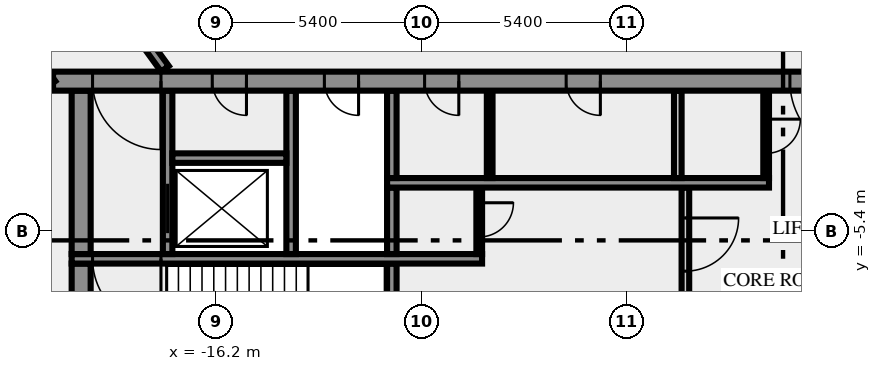
"""IFC4 building model, lengths in metres.
Left out: names, types, materials, properties, quantities, classifications, styles, units other than length and angle.
Written with IfcOpenShell. Run it as: python <this file> out.ifc"""

import sys

from ifc_helpers import new_model, si_unit, direction, frame, frame_2d, origin, place, context, subcontext, project, spatial, rectangle, extrude, element, fill, save


model = new_model("IFC4")
c1 = context("Model", 3, precision=1e-05, world=origin(), true_north=direction((0.0, 1.0)))
c2 = subcontext(c1, "Body", "Model", "MODEL_VIEW")
j1 = project(units=[si_unit("LENGTHUNIT", "METRE"), si_unit("PLANEANGLEUNIT", "RADIAN")], contexts=[c1])
p1 = place(None, origin())
s1 = spatial("IfcSite", under=j1, at=p1, CompositionType="ELEMENT")
p2 = place(p1, origin())
s2 = spatial("IfcBuilding", under=s1, at=p2, CompositionType="ELEMENT")
p3 = place(p2, frame((0.0, 0.0, 198.0)))
s3 = spatial("IfcBuildingStorey", under=s2, at=p3, CompositionType="ELEMENT", Elevation=198.0)
p4 = place(p3, frame((-19.75, -10.5, 0.0), z_axis=(0.0, 0.0, 1.0), x_axis=(0.0, 1.0, 0.0)))
e1 = element("IfcWall", 1, at=p4, inside=s3, PredefinedType="SHEAR", context=c2, shape_type="SweptSolid", body=[
    extrude(rectangle(XDim=4.25, YDim=0.5, at=frame_2d((2.125, 0.0))), origin(), (0.0, 0.0, 1.0), 3.65),
])
p5 = place(p3, frame((-11.575, -7.25, 0.0), z_axis=(0.0, 0.0, 1.0), x_axis=(0.0, 1.0, 0.0)))
e2 = element("IfcWall", 2, at=p5, inside=s3, PredefinedType="SHEAR", context=c2, shape_type="SweptSolid", body=[
    extrude(rectangle(XDim=1.0, YDim=0.25, at=frame_2d((0.5, 0.0))), origin(), (0.0, 0.0, 1.0), 3.65),
])
p6 = place(p3, frame((-3.85, -4.25, 0.0), z_axis=(0.0, 0.0, 1.0), x_axis=(0.0, -1.0, 0.0)))
e3 = element("IfcWall", 3, at=p6, inside=s3, PredefinedType="SOLIDWALL", context=c2, shape_type="SweptSolid", body=[
    extrude(rectangle(XDim=3.0, YDim=0.2, at=frame_2d((1.5, 0.0))), origin(), (0.0, 0.0, 1.0), 3.65),
])
p7 = place(p6, frame((0.8, 0.0, 0.0)))
e4 = element("IfcOpeningElement", 4, at=p7, cuts=e3, PredefinedType="OPENING", context=c2, shape_type="SweptSolid", body=[
    extrude(rectangle(XDim=1.4, YDim=2.1, at=frame_2d((0.7, 1.05))), frame((0.0, 0.11, 0.0), z_axis=(0.0, -1.0, 0.0), x_axis=(1.0, 0.0, 0.0)), (0.0, 0.0, 1.0), 0.22),
])
p8 = place(p3, frame((-9.2, -6.125, 0.0), z_axis=(0.0, 0.0, 1.0), x_axis=(-1.0, 0.0, 0.0)))
e5 = element("IfcWall", 5, at=p8, inside=s3, PredefinedType="SHEAR", context=c2, shape_type="SweptSolid", body=[
    extrude(rectangle(XDim=10.8, YDim=0.25, at=frame_2d((5.4, 0.0))), origin(), (0.0, 0.0, 1.0), 3.65),
])
p9 = place(p8, frame((8.45, 0.0, 0.0)))
e6 = element("IfcOpeningElement", 6, at=p9, cuts=e5, PredefinedType="OPENING", context=c2, shape_type="SweptSolid", body=[
    extrude(rectangle(XDim=1.8, YDim=2.1, at=frame_2d((0.9, 1.05))), frame((0.0, 0.135, 0.0), z_axis=(0.0, -1.0, 0.0), x_axis=(1.0, 0.0, 0.0)), (0.0, 0.0, 1.0), 0.27),
])
p10 = place(p3, frame((-19.75, -6.0, 0.0), z_axis=(0.0, 0.0, 1.0), x_axis=(0.0, 1.0, 0.0)))
e7 = element("IfcWall", 7, at=p10, inside=s3, PredefinedType="SHEAR", context=c2, shape_type="SweptSolid", body=[
    extrude(rectangle(XDim=4.3, YDim=0.5, at=frame_2d((2.15, 0.0))), origin(), (0.0, 0.0, 1.0), 3.65),
])
p11 = place(p3, frame((-17.475, -6.0, 0.0), z_axis=(0.0, 0.0, 1.0), x_axis=(0.0, 1.0, 0.0)))
e8 = element("IfcWall", 8, at=p11, inside=s3, PredefinedType="SHEAR", context=c2, shape_type="SweptSolid", body=[
    extrude(rectangle(XDim=4.3, YDim=0.25, at=frame_2d((2.15, 0.0))), origin(), (0.0, 0.0, 1.0), 3.65),
])
p12 = place(p11, frame((0.55, 0.0, 0.0)))
e9 = element("IfcOpeningElement", 9, at=p12, cuts=e8, PredefinedType="OPENING", context=c2, shape_type="SweptSolid", body=[
    extrude(rectangle(XDim=1.3, YDim=2.1, at=frame_2d((0.65, 1.05))), frame((0.0, 0.135, 0.0), z_axis=(0.0, -1.0, 0.0), x_axis=(1.0, 0.0, 0.0)), (0.0, 0.0, 1.0), 0.27),
])
p13 = place(p3, frame((-14.225, -6.0, 0.0), z_axis=(0.0, 0.0, 1.0), x_axis=(0.0, 1.0, 0.0)))
e10 = element("IfcWall", 10, at=p13, inside=s3, PredefinedType="SHEAR", context=c2, shape_type="SweptSolid", body=[
    extrude(rectangle(XDim=4.3, YDim=0.25, at=frame_2d((2.15, 0.0))), origin(), (0.0, 0.0, 1.0), 3.65),
])
p14 = place(p3, frame((-11.575, -6.0, 0.0), z_axis=(0.0, 0.0, 1.0), x_axis=(0.0, 1.0, 0.0)))
e11 = element("IfcWall", 11, at=p14, inside=s3, PredefinedType="SHEAR", context=c2, shape_type="SweptSolid", body=[
    extrude(rectangle(XDim=1.75, YDim=0.25, at=frame_2d((0.875, 0.0))), origin(), (0.0, 0.0, 1.0), 3.65),
])
p15 = place(p3, frame((-9.275, -4.25, 0.0), z_axis=(0.0, 0.0, 1.0), x_axis=(0.0, -1.0, 0.0)))
e12 = element("IfcWall", 12, at=p15, inside=s3, PredefinedType="PARTITIONING", context=c2, shape_type="SweptSolid", body=[
    extrude(rectangle(XDim=1.75, YDim=0.15, at=frame_2d((0.875, 0.0))), origin(), (0.0, 0.0, 1.0), 3.65),
])
p16 = place(p15, frame((0.4, 0.0, 0.0)))
e13 = element("IfcOpeningElement", 13, at=p16, cuts=e12, PredefinedType="OPENING", context=c2, shape_type="SweptSolid", body=[
    extrude(rectangle(XDim=0.9, YDim=2.1, at=frame_2d((0.45, 1.05))), frame((0.0, 0.085, 0.0), z_axis=(0.0, -1.0, 0.0), x_axis=(1.0, 0.0, 0.0)), (0.0, 0.0, 1.0), 0.17),
])
p17 = place(p3, frame((-11.7, -4.125, 0.0), z_axis=(0.0, 0.0, 1.0), x_axis=(1.0, 0.0, 0.0)))
e14 = element("IfcWall", 14, at=p17, inside=s3, PredefinedType="SHEAR", context=c2, shape_type="SweptSolid", body=[
    extrude(rectangle(XDim=10.05, YDim=0.25, at=frame_2d((5.025, 0.0))), origin(), (0.0, 0.0, 1.0), 3.65),
])
p18 = place(p3, frame((-11.575, -4.0, 0.0), z_axis=(0.0, 0.0, 1.0), x_axis=(0.0, 1.0, 0.0)))
e15 = element("IfcWall", 15, at=p18, inside=s3, PredefinedType="SHEAR", context=c2, shape_type="SweptSolid", body=[
    extrude(rectangle(XDim=2.3, YDim=0.25, at=frame_2d((1.15, 0.0))), origin(), (0.0, 0.0, 1.0), 3.65),
])
p19 = place(p3, frame((-9.0, -4.0, 0.0), z_axis=(0.0, 0.0, 1.0), x_axis=(0.0, 1.0, 0.0)))
e16 = element("IfcWall", 16, at=p19, inside=s3, PredefinedType="PARTITIONING", context=c2, shape_type="SweptSolid", body=[
    extrude(rectangle(XDim=2.3, YDim=0.15, at=frame_2d((1.15, 0.0))), origin(), (0.0, 0.0, 1.0), 3.65),
])
p20 = place(p3, frame((-4.05, -4.0, 0.0), z_axis=(0.0, 0.0, 1.0), x_axis=(0.0, 1.0, 0.0)))
e17 = element("IfcWall", 17, at=p20, inside=s3, PredefinedType="SOLIDWALL", context=c2, shape_type="SweptSolid", body=[
    extrude(rectangle(XDim=2.3, YDim=0.2, at=frame_2d((1.15, 0.0))), origin(), (0.0, 0.0, 1.0), 3.65),
])
p21 = place(p3, frame((-1.725, -1.7, 0.0), z_axis=(0.0, 0.0, 1.0), x_axis=(0.0, -1.0, 0.0)))
e18 = element("IfcWall", 18, at=p21, inside=s3, PredefinedType="PARTITIONING", context=c2, shape_type="SweptSolid", body=[
    extrude(rectangle(XDim=2.3, YDim=0.15, at=frame_2d((1.15, 0.0))), origin(), (0.0, 0.0, 1.0), 3.65),
])
p22 = place(p21, frame((0.75, 0.0, 0.0)))
e19 = element("IfcOpeningElement", 19, at=p22, cuts=e18, PredefinedType="OPENING", context=c2, shape_type="SweptSolid", body=[
    extrude(rectangle(XDim=0.9, YDim=2.1, at=frame_2d((0.45, 1.05))), frame((0.0, 0.085, 0.0), z_axis=(0.0, -1.0, 0.0), x_axis=(1.0, 0.0, 0.0)), (0.0, 0.0, 1.0), 0.17),
])
p23 = place(p3, frame((-17.35, -3.475, 0.0), z_axis=(0.0, 0.0, 1.0), x_axis=(1.0, 0.0, 0.0)))
e20 = element("IfcWall", 20, at=p23, inside=s3, PredefinedType="SHEAR", context=c2, shape_type="SweptSolid", body=[
    extrude(rectangle(XDim=3.0, YDim=0.25, at=frame_2d((1.5, 0.0))), origin(), (0.0, 0.0, 1.0), 3.65),
])
p24 = place(p3, frame((20.49, -1.45, 0.0), z_axis=(0.0, 0.0, 1.0), x_axis=(-1.0, 0.0, 0.0)))
e21 = element("IfcWall", 21, at=p24, inside=s3, PredefinedType="SHEAR", context=c2, shape_type="SweptSolid", body=[
    extrude(rectangle(XDim=40.98, YDim=0.5, at=frame_2d((20.49, 0.0))), origin(), (0.0, 0.0, 1.0), 3.65),
])
p25 = place(p24, frame((38.14, 0.0, 0.0)))
e22 = element("IfcOpeningElement", 22, at=p25, cuts=e21, PredefinedType="OPENING", context=c2, shape_type="SweptSolid", body=[
    extrude(rectangle(XDim=1.8, YDim=2.1, at=frame_2d((0.9, 1.05))), frame((0.0, 0.26, 0.0), z_axis=(0.0, -1.0, 0.0), x_axis=(1.0, 0.0, 0.0)), (0.0, 0.0, 1.0), 0.52),
])
p26 = place(p24, frame((35.89, 0.0, 0.0)))
e23 = element("IfcOpeningElement", 23, at=p26, cuts=e21, PredefinedType="OPENING", context=c2, shape_type="SweptSolid", body=[
    extrude(rectangle(XDim=0.9, YDim=2.1, at=frame_2d((0.45, 1.05))), frame((0.0, 0.26, 0.0), z_axis=(0.0, -1.0, 0.0), x_axis=(1.0, 0.0, 0.0)), (0.0, 0.0, 1.0), 0.52),
])
p27 = place(p24, frame((32.94, 0.0, 0.0)))
e24 = element("IfcOpeningElement", 24, at=p27, cuts=e21, PredefinedType="OPENING", context=c2, shape_type="SweptSolid", body=[
    extrude(rectangle(XDim=0.9, YDim=2.1, at=frame_2d((0.45, 1.05))), frame((0.0, 0.26, 0.0), z_axis=(0.0, -1.0, 0.0), x_axis=(1.0, 0.0, 0.0)), (0.0, 0.0, 1.0), 0.52),
])
p28 = place(p24, frame((30.302, 0.0, 0.0)))
e25 = element("IfcOpeningElement", 25, at=p28, cuts=e21, PredefinedType="OPENING", context=c2, shape_type="SweptSolid", body=[
    extrude(rectangle(XDim=0.9, YDim=2.1, at=frame_2d((0.45, 1.05))), frame((0.0, 0.26, 0.0), z_axis=(0.0, -1.0, 0.0), x_axis=(1.0, 0.0, 0.0)), (0.0, 0.0, 1.0), 0.52),
])
p29 = place(p24, frame((26.577, 0.0, 0.0)))
e26 = element("IfcOpeningElement", 26, at=p29, cuts=e21, PredefinedType="OPENING", context=c2, shape_type="SweptSolid", body=[
    extrude(rectangle(XDim=0.9, YDim=2.1, at=frame_2d((0.45, 1.05))), frame((0.0, 0.26, 0.0), z_axis=(0.0, -1.0, 0.0), x_axis=(1.0, 0.0, 0.0)), (0.0, 0.0, 1.0), 0.52),
])
p30 = place(p24, frame((19.59, 0.0, 0.0)))
e27 = element("IfcOpeningElement", 27, at=p30, cuts=e21, PredefinedType="OPENING", context=c2, shape_type="SweptSolid", body=[
    extrude(rectangle(XDim=2.0, YDim=2.1, at=frame_2d((1.0, 1.05))), frame((0.0, 0.26, 0.0), z_axis=(0.0, -1.0, 0.0), x_axis=(1.0, 0.0, 0.0)), (0.0, 0.0, 1.0), 0.52),
])
p31 = place(p24, frame((7.14, 0.0, 0.0)))
e28 = element("IfcOpeningElement", 28, at=p31, cuts=e21, PredefinedType="OPENING", context=c2, shape_type="SweptSolid", body=[
    extrude(rectangle(XDim=0.9, YDim=2.1, at=frame_2d((0.45, 1.05))), frame((0.0, 0.26, 0.0), z_axis=(0.0, -1.0, 0.0), x_axis=(1.0, 0.0, 0.0)), (0.0, 0.0, 1.0), 0.52),
])
p32 = place(p24, frame((5.028, 0.0, 0.0)))
e29 = element("IfcOpeningElement", 29, at=p32, cuts=e21, PredefinedType="OPENING", context=c2, shape_type="SweptSolid", body=[
    extrude(rectangle(XDim=0.8, YDim=2.1, at=frame_2d((0.4, 1.05))), frame((0.0, 0.26, 0.0), z_axis=(0.0, -1.0, 0.0), x_axis=(1.0, 0.0, 0.0)), (0.0, 0.0, 1.0), 0.52),
])
p33 = place(p24, frame((3.452, 0.0, 0.0)))
e30 = element("IfcOpeningElement", 30, at=p33, cuts=e21, PredefinedType="OPENING", context=c2, shape_type="SweptSolid", body=[
    extrude(rectangle(XDim=0.8, YDim=2.1, at=frame_2d((0.4, 1.05))), frame((0.0, 0.26, 0.0), z_axis=(0.0, -1.0, 0.0), x_axis=(1.0, 0.0, 0.0)), (0.0, 0.0, 1.0), 0.52),
])
p34 = place(p24, frame((1.04, 0.0, 0.0)))
e31 = element("IfcOpeningElement", 31, at=p34, cuts=e21, PredefinedType="OPENING", context=c2, shape_type="SweptSolid", body=[
    extrude(rectangle(XDim=1.8, YDim=2.1, at=frame_2d((0.9, 1.05))), frame((0.0, 0.26, 0.0), z_axis=(0.0, -1.0, 0.0), x_axis=(1.0, 0.0, 0.0)), (0.0, 0.0, 1.0), 0.52),
])
p35 = place(p3, frame((-20.531, -1.523, 0.0), z_axis=(0.0, 0.0, 1.0), x_axis=(-0.587785812891, 0.809016587076, 0.0)))
e32 = element("IfcWall", 32, at=p35, inside=s3, PredefinedType="SOLIDWALL", context=c2, shape_type="SweptSolid", body=[
    extrude(rectangle(XDim=28.67, YDim=0.25, at=frame_2d((14.335, 0.0))), origin(), (0.0, 0.0, 1.0), 3.65),
])
p36 = place(p35, frame((17.015, 0.0, 0.0)))
e33 = element("IfcOpeningElement", 33, at=p36, cuts=e32, PredefinedType="OPENING", context=c2, shape_type="SweptSolid", body=[
    extrude(rectangle(XDim=0.9, YDim=2.1, at=frame_2d((0.45, 1.05))), frame((0.0, 0.135, 0.0), z_axis=(0.0, -1.0, 0.0), x_axis=(1.0, 0.0, 0.0)), (0.0, 0.0, 1.0), 0.27),
])
p37 = place(p35, frame((8.916, 0.0, 0.0)))
e34 = element("IfcOpeningElement", 34, at=p37, cuts=e32, PredefinedType="OPENING", context=c2, shape_type="SweptSolid", body=[
    extrude(rectangle(XDim=0.9, YDim=2.1, at=frame_2d((0.45, 1.05))), frame((0.0, 0.135, 0.0), z_axis=(0.0, -1.0, 0.0), x_axis=(1.0, 0.0, 0.0)), (0.0, 0.0, 1.0), 0.27),
])
p38 = place(p35, frame((18.616, 0.0, 0.0)))
e35 = element("IfcOpeningElement", 35, at=p38, cuts=e32, PredefinedType="OPENING", context=c2, shape_type="SweptSolid", body=[
    extrude(rectangle(XDim=0.9, YDim=2.1, at=frame_2d((0.45, 1.05))), frame((0.0, 0.135, 0.0), z_axis=(0.0, -1.0, 0.0), x_axis=(1.0, 0.0, 0.0)), (0.0, 0.0, 1.0), 0.27),
])
p39 = place(p35, frame((11.615, 0.0, 0.0)))
e36 = element("IfcOpeningElement", 36, at=p39, cuts=e32, PredefinedType="OPENING", context=c2, shape_type="SweptSolid", body=[
    extrude(rectangle(XDim=0.9, YDim=2.1, at=frame_2d((0.45, 1.05))), frame((0.0, 0.135, 0.0), z_axis=(0.0, -1.0, 0.0), x_axis=(1.0, 0.0, 0.0)), (0.0, 0.0, 1.0), 0.27),
])
p40 = place(p3, frame((-35.092, 23.027, 0.0), z_axis=(0.0, 0.0, 1.0), x_axis=(0.587784076945, -0.809017848313, 0.0)))
e37 = element("IfcWall", 37, at=p40, inside=s3, PredefinedType="SOLIDWALL", context=c2, shape_type="SweptSolid", body=[
    extrude(rectangle(XDim=29.853, YDim=0.25, at=frame_2d((14.927, 0.0))), origin(), (0.0, 0.0, 1.0), 3.65),
])
p41 = place(p40, frame((10.095, 0.0, 0.0)))
e38 = element("IfcOpeningElement", 38, at=p41, cuts=e37, PredefinedType="OPENING", context=c2, shape_type="SweptSolid", body=[
    extrude(rectangle(XDim=0.9, YDim=2.1, at=frame_2d((0.45, 1.05))), frame((0.0, 0.135, 0.0), z_axis=(0.0, -1.0, 0.0), x_axis=(1.0, 0.0, 0.0)), (0.0, 0.0, 1.0), 0.27),
])
p42 = place(p40, frame((15.495, 0.0, 0.0)))
e39 = element("IfcOpeningElement", 39, at=p42, cuts=e37, PredefinedType="OPENING", context=c2, shape_type="SweptSolid", body=[
    extrude(rectangle(XDim=0.9, YDim=2.1, at=frame_2d((0.45, 1.05))), frame((0.0, 0.135, 0.0), z_axis=(0.0, -1.0, 0.0), x_axis=(1.0, 0.0, 0.0)), (0.0, 0.0, 1.0), 0.27),
])
p43 = place(p40, frame((0.224, 0.0, 0.0)))
e40 = element("IfcOpeningElement", 40, at=p43, cuts=e37, PredefinedType="OPENING", context=c2, shape_type="SweptSolid", body=[
    extrude(rectangle(XDim=0.9, YDim=2.1, at=frame_2d((0.45, 1.05))), frame((0.0, 0.135, 0.0), z_axis=(0.0, -1.0, 0.0), x_axis=(1.0, 0.0, 0.0)), (0.0, 0.0, 1.0), 0.27),
])
p44 = place(p7, origin())
e41 = element("IfcDoor", 41, at=p44, inside=s3, OperationType="DOUBLE_DOOR_SINGLE_SWING", PredefinedType="DOOR", context=c2, shape_type="SweptSolid", body=[
    extrude(rectangle(XDim=1.4, YDim=2.1, at=frame_2d((0.7, 1.05))), frame((0.0, 0.025, 0.0), z_axis=(0.0, -1.0, 0.0), x_axis=(1.0, 0.0, 0.0)), (0.0, 0.0, 1.0), 0.05),
])
fill(e4, e41)
p45 = place(p9, origin())
e42 = element("IfcDoor", 42, at=p45, inside=s3, OperationType="DOUBLE_DOOR_SINGLE_SWING", PredefinedType="DOOR", context=c2, shape_type="SweptSolid", body=[
    extrude(rectangle(XDim=1.8, YDim=2.1, at=frame_2d((0.9, 1.05))), frame((0.0, 0.025, 0.0), z_axis=(0.0, -1.0, 0.0), x_axis=(1.0, 0.0, 0.0)), (0.0, 0.0, 1.0), 0.05),
])
fill(e6, e42)
p46 = place(p12, origin())
e43 = element("IfcDoor", 43, at=p46, inside=s3, OperationType="DOUBLE_DOOR_SLIDING", PredefinedType="DOOR", context=c2, shape_type="SweptSolid", body=[
    extrude(rectangle(XDim=1.3, YDim=2.1, at=frame_2d((0.65, 1.05))), frame((0.0, 0.025, 0.0), z_axis=(0.0, -1.0, 0.0), x_axis=(1.0, 0.0, 0.0)), (0.0, 0.0, 1.0), 0.05),
])
fill(e9, e43)
p47 = place(p16, origin())
e44 = element("IfcDoor", 44, at=p47, inside=s3, OperationType="SINGLE_SWING_LEFT", PredefinedType="DOOR", context=c2, shape_type="SweptSolid", body=[
    extrude(rectangle(XDim=0.9, YDim=2.1, at=frame_2d((0.45, 1.05))), frame((0.0, 0.025, 0.0), z_axis=(0.0, -1.0, 0.0), x_axis=(1.0, 0.0, 0.0)), (0.0, 0.0, 1.0), 0.05),
])
fill(e13, e44)
p48 = place(p22, origin())
e45 = element("IfcDoor", 45, at=p48, inside=s3, OperationType="SINGLE_SWING_RIGHT", PredefinedType="DOOR", context=c2, shape_type="SweptSolid", body=[
    extrude(rectangle(XDim=0.9, YDim=2.1, at=frame_2d((0.45, 1.05))), frame((0.0, 0.025, 0.0), z_axis=(0.0, -1.0, 0.0), x_axis=(1.0, 0.0, 0.0)), (0.0, 0.0, 1.0), 0.05),
])
fill(e19, e45)
p49 = place(p25, origin())
e46 = element("IfcDoor", 46, at=p49, inside=s3, OperationType="DOUBLE_DOOR_SINGLE_SWING", PredefinedType="DOOR", context=c2, shape_type="SweptSolid", body=[
    extrude(rectangle(XDim=1.8, YDim=2.1, at=frame_2d((0.9, 1.05))), frame((0.0, 0.025, 0.0), z_axis=(0.0, -1.0, 0.0), x_axis=(1.0, 0.0, 0.0)), (0.0, 0.0, 1.0), 0.05),
])
fill(e22, e46)
p50 = place(p26, origin())
e47 = element("IfcDoor", 47, at=p50, inside=s3, OperationType="SINGLE_SWING_RIGHT", PredefinedType="DOOR", context=c2, shape_type="SweptSolid", body=[
    extrude(rectangle(XDim=0.9, YDim=2.1, at=frame_2d((0.45, 1.05))), frame((0.0, 0.025, 0.0), z_axis=(0.0, -1.0, 0.0), x_axis=(1.0, 0.0, 0.0)), (0.0, 0.0, 1.0), 0.05),
])
fill(e23, e47)
p51 = place(p27, origin())
e48 = element("IfcDoor", 48, at=p51, inside=s3, OperationType="SINGLE_SWING_RIGHT", PredefinedType="DOOR", context=c2, shape_type="SweptSolid", body=[
    extrude(rectangle(XDim=0.9, YDim=2.1, at=frame_2d((0.45, 1.05))), frame((0.0, 0.025, 0.0), z_axis=(0.0, -1.0, 0.0), x_axis=(1.0, 0.0, 0.0)), (0.0, 0.0, 1.0), 0.05),
])
fill(e24, e48)
p52 = place(p28, origin())
e49 = element("IfcDoor", 49, at=p52, inside=s3, OperationType="SINGLE_SWING_RIGHT", PredefinedType="DOOR", context=c2, shape_type="SweptSolid", body=[
    extrude(rectangle(XDim=0.9, YDim=2.1, at=frame_2d((0.45, 1.05))), frame((0.0, 0.025, 0.0), z_axis=(0.0, -1.0, 0.0), x_axis=(1.0, 0.0, 0.0)), (0.0, 0.0, 1.0), 0.05),
])
fill(e25, e49)
p53 = place(p29, origin())
e50 = element("IfcDoor", 50, at=p53, inside=s3, OperationType="SINGLE_SWING_RIGHT", PredefinedType="DOOR", context=c2, shape_type="SweptSolid", body=[
    extrude(rectangle(XDim=0.9, YDim=2.1, at=frame_2d((0.45, 1.05))), frame((0.0, 0.025, 0.0), z_axis=(0.0, -1.0, 0.0), x_axis=(1.0, 0.0, 0.0)), (0.0, 0.0, 1.0), 0.05),
])
fill(e26, e50)
p54 = place(p30, origin())
e51 = element("IfcDoor", 51, at=p54, inside=s3, OperationType="DOUBLE_DOOR_SINGLE_SWING", PredefinedType="DOOR", context=c2, shape_type="SweptSolid", body=[
    extrude(rectangle(XDim=2.0, YDim=2.1, at=frame_2d((1.0, 1.05))), frame((0.0, 0.025, 0.0), z_axis=(0.0, -1.0, 0.0), x_axis=(1.0, 0.0, 0.0)), (0.0, 0.0, 1.0), 0.05),
])
fill(e27, e51)
save(model, sys.argv[1])
